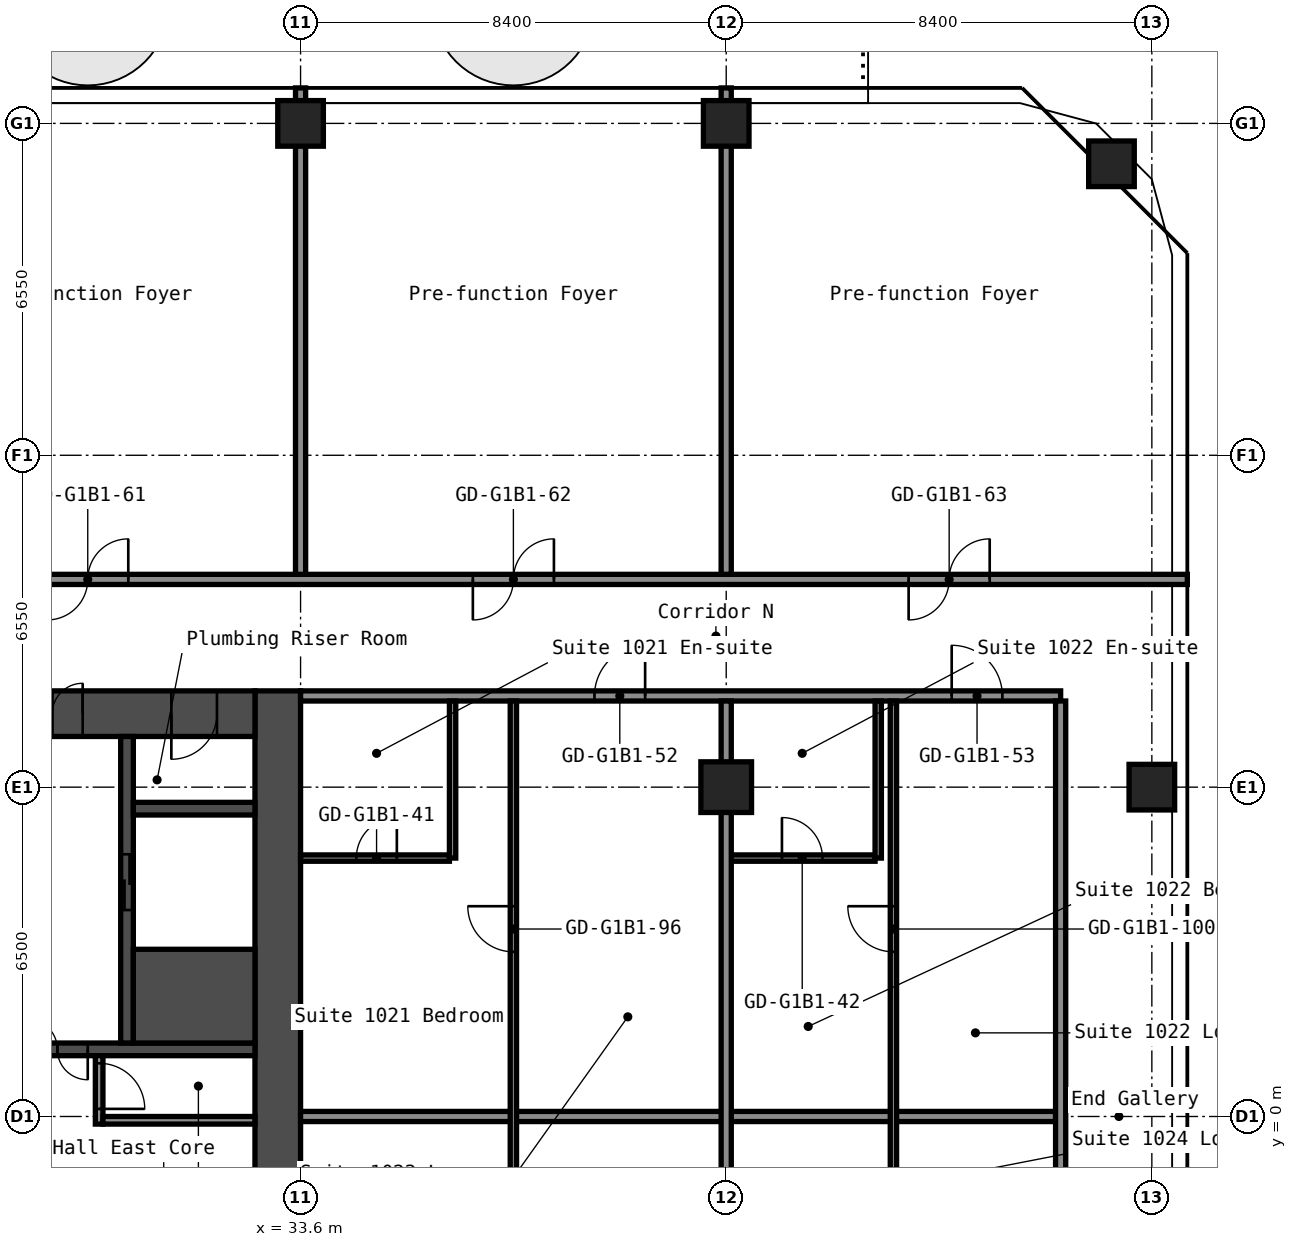
"""IFC4 building model, lengths in metres.
Left out: names, types, materials, properties, quantities, classifications, styles, units other than length and angle.
Written with IfcOpenShell. Run it as: python <this file> out.ifc"""

import sys

from ifc_helpers import new_model, si_unit, direction, frame, frame_2d, origin, origin_2d, place, context, subcontext, project, spatial, rectangle, hollow_rectangle, extrude, element, fill, save


model = new_model("IFC4")
c1 = context("Model", 3, precision=1e-05, world=origin(), true_north=direction((0.0, 1.0)))
c2 = subcontext(c1, "Body", "Model", "MODEL_VIEW")
j1 = project(units=[si_unit("LENGTHUNIT", "METRE"), si_unit("PLANEANGLEUNIT", "RADIAN")], contexts=[c1])
p1 = place(None, origin())
s1 = spatial("IfcSite", under=j1, at=p1, CompositionType="ELEMENT")
p2 = place(p1, origin())
s2 = spatial("IfcBuilding", under=s1, at=p2, CompositionType="ELEMENT")
p3 = place(p2, frame((0.0, 0.0, 39.0)))
s3 = spatial("IfcBuildingStorey", under=s2, at=p3, CompositionType="ELEMENT", Elevation=39.0)
p4 = place(p3, frame((33.6, 19.6, 0.0), z_axis=(0.0, 0.0, 1.0), x_axis=(1.0, 0.0, 0.0)))
e1 = element("IfcColumn", 1, at=p4, inside=s3, PredefinedType="COLUMN", context=c2, shape_type="SweptSolid", body=[
    extrude(hollow_rectangle(XDim=0.9, YDim=0.9, WallThickness=0.036, at=origin_2d()), origin(), (0.0, 0.0, 1.0), 2.8),
])
p5 = place(p3, frame((42.0, 6.5, 0.0), z_axis=(0.0, 0.0, 1.0), x_axis=(1.0, 0.0, 0.0)))
e2 = element("IfcColumn", 2, at=p5, inside=s3, PredefinedType="COLUMN", context=c2, shape_type="SweptSolid", body=[
    extrude(hollow_rectangle(XDim=1.0, YDim=1.0, WallThickness=0.04, at=origin_2d()), origin(), (0.0, 0.0, 1.0), 2.8),
])
for number, where, z_axis, x_axis in (
    (3, (42.0, 19.6, 0.0), (0.0, 0.0, 1.0), (1.0, 0.0, 0.0)),
    (4, (50.4, 6.5, 0.0), (0.0, 0.0, 1.0), (1.0, 0.0, 0.0)),
    (5, (49.603, 18.803, 0.0), (0.0, 0.0, 1.0), (1.0, 0.0, 0.0)),
):
    element("IfcColumn", number, at=place(p3, frame(where, z_axis=z_axis, x_axis=x_axis)), inside=s3, PredefinedType="COLUMN", context=c2, shape_type="SweptSolid", body=[
        extrude(hollow_rectangle(XDim=0.9, YDim=0.9, WallThickness=0.036, at=origin_2d()), origin(), (0.0, 0.0, 1.0), 2.8),
    ])
p6 = place(p3, frame((33.15, -8.4, 0.0), z_axis=(0.0, 0.0, 1.0), x_axis=(0.0, 1.0, 0.0)))
e6 = element("IfcWall", 6, at=p6, inside=s3, PredefinedType="SHEAR", context=c2, shape_type="SweptSolid", body=[
    extrude(rectangle(XDim=16.8, YDim=0.9, at=frame_2d((8.4, 0.0))), origin(), (0.0, 0.0, 1.0), 2.8),
])
p7 = place(p3, frame((17.7, 7.95, 0.0), z_axis=(0.0, 0.0, 1.0), x_axis=(1.0, 0.0, 0.0)))
e7 = element("IfcWall", 7, at=p7, inside=s3, PredefinedType="SHEAR", context=c2, shape_type="SweptSolid", body=[
    extrude(rectangle(XDim=15.0, YDim=0.9, at=frame_2d((7.5, 0.0))), origin(), (0.0, 0.0, 1.0), 2.8),
])
p8 = place(p7, frame((10.4, 0.0, 0.0)))
e8 = element("IfcOpeningElement", 8, at=p8, cuts=e7, PredefinedType="OPENING", context=c2, shape_type="SweptSolid", body=[
    extrude(rectangle(XDim=1.2, YDim=2.1, at=frame_2d((0.6, 1.05))), frame((0.0, 0.46, 0.0), z_axis=(0.0, -1.0, 0.0), x_axis=(1.0, 0.0, 0.0)), (0.0, 0.0, 1.0), 0.92),
])
p9 = place(p7, frame((13.35, 0.0, 0.0)))
e9 = element("IfcOpeningElement", 9, at=p9, cuts=e7, PredefinedType="OPENING", context=c2, shape_type="SweptSolid", body=[
    extrude(rectangle(XDim=0.9, YDim=2.1, at=frame_2d((0.45, 1.05))), frame((0.0, 0.46, 0.0), z_axis=(0.0, -1.0, 0.0), x_axis=(1.0, 0.0, 0.0)), (0.0, 0.0, 1.0), 0.92),
])
p10 = place(p3, frame((27.65, 1.325, 0.0), z_axis=(0.0, 0.0, 1.0), x_axis=(1.0, 0.0, 0.0)))
e10 = element("IfcWall", 10, at=p10, inside=s3, PredefinedType="SHEAR", context=c2, shape_type="SweptSolid", body=[
    extrude(rectangle(XDim=5.05, YDim=0.25, at=frame_2d((2.525, 0.0))), origin(), (0.0, 0.0, 1.0), 2.8),
])
p11 = place(p10, frame((0.55, 0.0, 0.0)))
e11 = element("IfcOpeningElement", 11, at=p11, cuts=e10, PredefinedType="OPENING", context=c2, shape_type="SweptSolid", body=[
    extrude(rectangle(XDim=1.2, YDim=2.1, at=frame_2d((0.6, 1.05))), frame((0.0, 0.135, 0.0), z_axis=(0.0, -1.0, 0.0), x_axis=(1.0, 0.0, 0.0)), (0.0, 0.0, 1.0), 0.27),
])
p12 = place(p3, frame((30.175, 1.45, 0.0), z_axis=(0.0, 0.0, 1.0), x_axis=(0.0, 1.0, 0.0)))
e12 = element("IfcWall", 12, at=p12, inside=s3, PredefinedType="SHEAR", context=c2, shape_type="SweptSolid", body=[
    extrude(rectangle(XDim=6.05, YDim=0.25, at=frame_2d((3.025, 0.0))), origin(), (0.0, 0.0, 1.0), 2.8),
])
p13 = place(p12, frame((2.625, 0.0, 0.0)))
e13 = element("IfcOpeningElement", 13, at=p13, cuts=e12, PredefinedType="OPENING", context=c2, shape_type="SweptSolid", body=[
    extrude(rectangle(XDim=1.1, YDim=2.1, at=frame_2d((0.55, 1.05))), frame((0.0, 0.135, 0.0), z_axis=(0.0, -1.0, 0.0), x_axis=(1.0, 0.0, 0.0)), (0.0, 0.0, 1.0), 0.27),
])
p14 = place(p3, frame((30.3, 2.375, 0.0), z_axis=(0.0, 0.0, 1.0), x_axis=(1.0, 0.0, 0.0)))
e14 = element("IfcWall", 14, at=p14, inside=s3, PredefinedType="SHEAR", context=c2, shape_type="SweptSolid", body=[
    extrude(rectangle(XDim=2.4, YDim=1.85, at=frame_2d((1.2, 0.0))), origin(), (0.0, 0.0, 1.0), 2.8),
])
p15 = place(p3, frame((30.3, 6.075, 0.0), z_axis=(0.0, 0.0, 1.0), x_axis=(1.0, 0.0, 0.0)))
e15 = element("IfcWall", 15, at=p15, inside=s3, PredefinedType="SHEAR", context=c2, shape_type="SweptSolid", body=[
    extrude(rectangle(XDim=2.4, YDim=0.25, at=frame_2d((1.2, 0.0))), origin(), (0.0, 0.0, 1.0), 2.8),
])
p16 = place(p3, frame((29.625, -0.15, 0.0), z_axis=(0.0, 0.0, 1.0), x_axis=(0.0, 1.0, 0.0)))
e16 = element("IfcWall", 16, at=p16, inside=s3, PredefinedType="PARTITIONING", context=c2, shape_type="SweptSolid", body=[
    extrude(rectangle(XDim=1.35, YDim=0.15, at=frame_2d((0.675, 0.0))), origin(), (0.0, 0.0, 1.0), 2.8),
])
p17 = place(p16, frame((0.3, 0.0, 0.0)))
e17 = element("IfcOpeningElement", 17, at=p17, cuts=e16, PredefinedType="OPENING", context=c2, shape_type="SweptSolid", body=[
    extrude(rectangle(XDim=0.9, YDim=2.1, at=frame_2d((0.45, 1.05))), frame((0.0, 0.085, 0.0), z_axis=(0.0, -1.0, 0.0), x_axis=(1.0, 0.0, 0.0)), (0.0, 0.0, 1.0), 0.17),
])
p18 = place(p3, frame((29.7, -0.075, 0.0), z_axis=(0.0, 0.0, 1.0), x_axis=(1.0, 0.0, 0.0)))
e18 = element("IfcWall", 18, at=p18, inside=s3, PredefinedType="PARTITIONING", context=c2, shape_type="SweptSolid", body=[
    extrude(rectangle(XDim=3.0, YDim=0.15, at=frame_2d((1.5, 0.0))), origin(), (0.0, 0.0, 1.0), 2.8),
])
p19 = place(p3, frame((33.6, 0.0, 0.0), z_axis=(0.0, 0.0, 1.0), x_axis=(1.0, 0.0, 0.0)))
e19 = element("IfcWall", 19, at=p19, inside=s3, PredefinedType="PARTITIONING", context=c2, shape_type="SweptSolid", body=[
    extrude(rectangle(XDim=14.9, YDim=0.2, at=frame_2d((7.45, 0.0))), origin(), (0.0, 0.0, 1.0), 2.8),
])
p20 = place(p3, frame((33.6, 5.1, 0.0), z_axis=(0.0, 0.0, 1.0), x_axis=(1.0, 0.0, 0.0)))
e20 = element("IfcWall", 20, at=p20, inside=s3, PredefinedType="PARTITIONING", context=c2, shape_type="SweptSolid", body=[
    extrude(rectangle(XDim=2.938, YDim=0.125, at=frame_2d((1.469, 0.0))), origin(), (0.0, 0.0, 1.0), 2.8),
])
p21 = place(p20, frame((1.1, 0.0, 0.0)))
e21 = element("IfcOpeningElement", 21, at=p21, cuts=e20, PredefinedType="OPENING", context=c2, shape_type="SweptSolid", body=[
    extrude(rectangle(XDim=0.8, YDim=2.1, at=frame_2d((0.4, 1.05))), frame((0.0, 0.073, 0.0), z_axis=(0.0, -1.0, 0.0), x_axis=(1.0, 0.0, 0.0)), (0.0, 0.0, 1.0), 0.145),
])
p22 = place(p3, frame((42.1, 5.1, 0.0), z_axis=(0.0, 0.0, 1.0), x_axis=(1.0, 0.0, 0.0)))
e22 = element("IfcWall", 22, at=p22, inside=s3, PredefinedType="PARTITIONING", context=c2, shape_type="SweptSolid", body=[
    extrude(rectangle(XDim=2.837, YDim=0.125, at=frame_2d((1.419, 0.0))), origin(), (0.0, 0.0, 1.0), 2.8),
])
p23 = place(p22, frame((1.0, 0.0, 0.0)))
e23 = element("IfcOpeningElement", 23, at=p23, cuts=e22, PredefinedType="OPENING", context=c2, shape_type="SweptSolid", body=[
    extrude(rectangle(XDim=0.8, YDim=2.1, at=frame_2d((0.4, 1.05))), frame((0.0, 0.073, 0.0), z_axis=(0.0, -1.0, 0.0), x_axis=(1.0, 0.0, 0.0)), (0.0, 0.0, 1.0), 0.145),
])
p24 = place(p3, frame((33.6, 8.3, 0.0), z_axis=(0.0, 0.0, 1.0), x_axis=(1.0, 0.0, 0.0)))
e24 = element("IfcWall", 24, at=p24, inside=s3, PredefinedType="PARTITIONING", context=c2, shape_type="SweptSolid", body=[
    extrude(rectangle(XDim=15.0, YDim=0.2, at=frame_2d((7.5, 0.0))), origin(), (0.0, 0.0, 1.0), 2.8),
])
p25 = place(p24, frame((5.8, 0.0, 0.0)))
e25 = element("IfcOpeningElement", 25, at=p25, cuts=e24, PredefinedType="OPENING", context=c2, shape_type="SweptSolid", body=[
    extrude(rectangle(XDim=1.0, YDim=2.1, at=frame_2d((0.5, 1.05))), frame((0.0, 0.11, 0.0), z_axis=(0.0, -1.0, 0.0), x_axis=(1.0, 0.0, 0.0)), (0.0, 0.0, 1.0), 0.22),
])
p26 = place(p24, frame((12.85, 0.0, 0.0)))
e26 = element("IfcOpeningElement", 26, at=p26, cuts=e24, PredefinedType="OPENING", context=c2, shape_type="SweptSolid", body=[
    extrude(rectangle(XDim=1.0, YDim=2.1, at=frame_2d((0.5, 1.05))), frame((0.0, 0.11, 0.0), z_axis=(0.0, -1.0, 0.0), x_axis=(1.0, 0.0, 0.0)), (0.0, 0.0, 1.0), 0.22),
])
p27 = place(p3, frame((16.8, 10.6, 0.0), z_axis=(0.0, 0.0, 1.0), x_axis=(1.0, 0.0, 0.0)))
e27 = element("IfcWall", 27, at=p27, inside=s3, PredefinedType="PARTITIONING", context=c2, shape_type="SweptSolid", body=[
    extrude(rectangle(XDim=34.3, YDim=0.2, at=frame_2d((17.15, 0.0))), origin(), (0.0, 0.0, 1.0), 2.8),
])
p28 = place(p27, frame((3.4, 0.0, 0.0)))
e28 = element("IfcOpeningElement", 28, at=p28, cuts=e27, PredefinedType="OPENING", context=c2, shape_type="SweptSolid", body=[
    extrude(rectangle(XDim=1.6, YDim=2.1, at=frame_2d((0.8, 1.05))), frame((0.0, 0.11, 0.0), z_axis=(0.0, -1.0, 0.0), x_axis=(1.0, 0.0, 0.0)), (0.0, 0.0, 1.0), 0.22),
])
p29 = place(p27, frame((11.8, 0.0, 0.0)))
e29 = element("IfcOpeningElement", 29, at=p29, cuts=e27, PredefinedType="OPENING", context=c2, shape_type="SweptSolid", body=[
    extrude(rectangle(XDim=1.6, YDim=2.1, at=frame_2d((0.8, 1.05))), frame((0.0, 0.11, 0.0), z_axis=(0.0, -1.0, 0.0), x_axis=(1.0, 0.0, 0.0)), (0.0, 0.0, 1.0), 0.22),
])
p30 = place(p27, frame((20.2, 0.0, 0.0)))
e30 = element("IfcOpeningElement", 30, at=p30, cuts=e27, PredefinedType="OPENING", context=c2, shape_type="SweptSolid", body=[
    extrude(rectangle(XDim=1.6, YDim=2.1, at=frame_2d((0.8, 1.05))), frame((0.0, 0.11, 0.0), z_axis=(0.0, -1.0, 0.0), x_axis=(1.0, 0.0, 0.0)), (0.0, 0.0, 1.0), 0.22),
])
p31 = place(p27, frame((28.8, 0.0, 0.0)))
e31 = element("IfcOpeningElement", 31, at=p31, cuts=e27, PredefinedType="OPENING", context=c2, shape_type="SweptSolid", body=[
    extrude(rectangle(XDim=1.6, YDim=2.1, at=frame_2d((0.8, 1.05))), frame((0.0, 0.11, 0.0), z_axis=(0.0, -1.0, 0.0), x_axis=(1.0, 0.0, 0.0)), (0.0, 0.0, 1.0), 0.22),
])
p32 = place(p3, frame((33.6, 10.7, 0.0), z_axis=(0.0, 0.0, 1.0), x_axis=(0.0, 1.0, 0.0)))
e32 = element("IfcWall", 32, at=p32, inside=s3, PredefinedType="PARTITIONING", context=c2, shape_type="SweptSolid", body=[
    extrude(rectangle(XDim=9.6, YDim=0.2, at=frame_2d((4.8, 0.0))), origin(), (0.0, 0.0, 1.0), 2.8),
])
p33 = place(p3, frame((36.6, 5.1, 0.0), z_axis=(0.0, 0.0, 1.0), x_axis=(0.0, 1.0, 0.0)))
e33 = element("IfcWall", 33, at=p33, inside=s3, PredefinedType="PARTITIONING", context=c2, shape_type="SweptSolid", body=[
    extrude(rectangle(XDim=3.1, YDim=0.125, at=frame_2d((1.55, 0.0))), origin(), (0.0, 0.0, 1.0), 2.8),
])
p34 = place(p3, frame((37.8, -8.2, 0.0), z_axis=(0.0, 0.0, 1.0), x_axis=(0.0, 1.0, 0.0)))
e34 = element("IfcWall", 34, at=p34, inside=s3, PredefinedType="PARTITIONING", context=c2, shape_type="SweptSolid", body=[
    extrude(rectangle(XDim=16.4, YDim=0.125, at=frame_2d((8.2, 0.0))), origin(), (0.0, 0.0, 1.0), 2.8),
])
p35 = place(p34, frame((4.05, 0.0, 0.0)))
e35 = element("IfcOpeningElement", 35, at=p35, cuts=e34, PredefinedType="OPENING", context=c2, shape_type="SweptSolid", body=[
    extrude(rectangle(XDim=0.9, YDim=2.1, at=frame_2d((0.45, 1.05))), frame((0.0, 0.073, 0.0), z_axis=(0.0, -1.0, 0.0), x_axis=(1.0, 0.0, 0.0)), (0.0, 0.0, 1.0), 0.145),
])
p36 = place(p34, frame((11.45, 0.0, 0.0)))
e36 = element("IfcOpeningElement", 36, at=p36, cuts=e34, PredefinedType="OPENING", context=c2, shape_type="SweptSolid", body=[
    extrude(rectangle(XDim=0.9, YDim=2.1, at=frame_2d((0.45, 1.05))), frame((0.0, 0.073, 0.0), z_axis=(0.0, -1.0, 0.0), x_axis=(1.0, 0.0, 0.0)), (0.0, 0.0, 1.0), 0.145),
])
p37 = place(p3, frame((42.0, -8.2, 0.0), z_axis=(0.0, 0.0, 1.0), x_axis=(0.0, 1.0, 0.0)))
e37 = element("IfcWall", 37, at=p37, inside=s3, PredefinedType="PARTITIONING", context=c2, shape_type="SweptSolid", body=[
    extrude(rectangle(XDim=16.4, YDim=0.2, at=frame_2d((8.2, 0.0))), origin(), (0.0, 0.0, 1.0), 2.8),
])
p38 = place(p3, frame((42.0, 10.7, 0.0), z_axis=(0.0, 0.0, 1.0), x_axis=(0.0, 1.0, 0.0)))
e38 = element("IfcWall", 38, at=p38, inside=s3, PredefinedType="PARTITIONING", context=c2, shape_type="SweptSolid", body=[
    extrude(rectangle(XDim=9.6, YDim=0.2, at=frame_2d((4.8, 0.0))), origin(), (0.0, 0.0, 1.0), 2.8),
])
p39 = place(p3, frame((45.0, 5.1, 0.0), z_axis=(0.0, 0.0, 1.0), x_axis=(0.0, 1.0, 0.0)))
e39 = element("IfcWall", 39, at=p39, inside=s3, PredefinedType="PARTITIONING", context=c2, shape_type="SweptSolid", body=[
    extrude(rectangle(XDim=3.1, YDim=0.125, at=frame_2d((1.55, 0.0))), origin(), (0.0, 0.0, 1.0), 2.8),
])
p40 = place(p3, frame((45.3, -8.2, 0.0), z_axis=(0.0, 0.0, 1.0), x_axis=(0.0, 1.0, 0.0)))
e40 = element("IfcWall", 40, at=p40, inside=s3, PredefinedType="PARTITIONING", context=c2, shape_type="SweptSolid", body=[
    extrude(rectangle(XDim=16.4, YDim=0.125, at=frame_2d((8.2, 0.0))), origin(), (0.0, 0.0, 1.0), 2.8),
])
p41 = place(p40, frame((4.05, 0.0, 0.0)))
e41 = element("IfcOpeningElement", 41, at=p41, cuts=e40, PredefinedType="OPENING", context=c2, shape_type="SweptSolid", body=[
    extrude(rectangle(XDim=0.9, YDim=2.1, at=frame_2d((0.45, 1.05))), frame((0.0, 0.073, 0.0), z_axis=(0.0, -1.0, 0.0), x_axis=(1.0, 0.0, 0.0)), (0.0, 0.0, 1.0), 0.145),
])
p42 = place(p40, frame((11.45, 0.0, 0.0)))
e42 = element("IfcOpeningElement", 42, at=p42, cuts=e40, PredefinedType="OPENING", context=c2, shape_type="SweptSolid", body=[
    extrude(rectangle(XDim=0.9, YDim=2.1, at=frame_2d((0.45, 1.05))), frame((0.0, 0.073, 0.0), z_axis=(0.0, -1.0, 0.0), x_axis=(1.0, 0.0, 0.0)), (0.0, 0.0, 1.0), 0.145),
])
p43 = place(p3, frame((48.6, -8.2, 0.0), z_axis=(0.0, 0.0, 1.0), x_axis=(0.0, 1.0, 0.0)))
e43 = element("IfcWall", 43, at=p43, inside=s3, PredefinedType="PARTITIONING", context=c2, shape_type="SweptSolid", body=[
    extrude(rectangle(XDim=16.4, YDim=0.2, at=frame_2d((8.2, 0.0))), origin(), (0.0, 0.0, 1.0), 2.8),
])
p44 = place(p8, origin())
e44 = element("IfcDoor", 44, at=p44, inside=s3, OperationType="DOUBLE_DOOR_SINGLE_SWING", PredefinedType="DOOR", context=c2, shape_type="SweptSolid", body=[
    extrude(rectangle(XDim=1.2, YDim=2.1, at=frame_2d((0.6, 1.05))), frame((0.0, 0.025, 0.0), z_axis=(0.0, -1.0, 0.0), x_axis=(1.0, 0.0, 0.0)), (0.0, 0.0, 1.0), 0.05),
])
fill(e8, e44)
p45 = place(p9, origin())
e45 = element("IfcDoor", 45, at=p45, inside=s3, OperationType="SINGLE_SWING_LEFT", PredefinedType="DOOR", context=c2, shape_type="SweptSolid", body=[
    extrude(rectangle(XDim=0.9, YDim=2.1, at=frame_2d((0.45, 1.05))), frame((0.0, 0.025, 0.0), z_axis=(0.0, -1.0, 0.0), x_axis=(1.0, 0.0, 0.0)), (0.0, 0.0, 1.0), 0.05),
])
fill(e9, e45)
p46 = place(p11, origin())
e46 = element("IfcDoor", 46, at=p46, inside=s3, OperationType="DOUBLE_DOOR_SINGLE_SWING", PredefinedType="DOOR", context=c2, shape_type="SweptSolid", body=[
    extrude(rectangle(XDim=1.2, YDim=2.1, at=frame_2d((0.6, 1.05))), frame((0.0, 0.025, 0.0), z_axis=(0.0, -1.0, 0.0), x_axis=(1.0, 0.0, 0.0)), (0.0, 0.0, 1.0), 0.05),
])
fill(e11, e46)
p47 = place(p17, origin())
e47 = element("IfcDoor", 47, at=p47, inside=s3, OperationType="SINGLE_SWING_LEFT", PredefinedType="DOOR", context=c2, shape_type="SweptSolid", body=[
    extrude(rectangle(XDim=0.9, YDim=2.1, at=frame_2d((0.45, 1.05))), frame((0.0, 0.025, 0.0), z_axis=(0.0, -1.0, 0.0), x_axis=(1.0, 0.0, 0.0)), (0.0, 0.0, 1.0), 0.05),
])
fill(e17, e47)
p48 = place(p13, origin())
e48 = element("IfcDoor", 48, at=p48, inside=s3, OperationType="DOUBLE_DOOR_SLIDING", PredefinedType="DOOR", context=c2, shape_type="SweptSolid", body=[
    extrude(rectangle(XDim=1.1, YDim=2.1, at=frame_2d((0.55, 1.05))), frame((0.0, 0.025, 0.0), z_axis=(0.0, -1.0, 0.0), x_axis=(1.0, 0.0, 0.0)), (0.0, 0.0, 1.0), 0.05),
])
fill(e13, e48)
p49 = place(p21, origin())
e49 = element("IfcDoor", 49, at=p49, inside=s3, OperationType="SINGLE_SWING_LEFT", PredefinedType="DOOR", context=c2, shape_type="SweptSolid", body=[
    extrude(rectangle(XDim=0.8, YDim=2.1, at=frame_2d((0.4, 1.05))), frame((0.0, 0.025, 0.0), z_axis=(0.0, -1.0, 0.0), x_axis=(1.0, 0.0, 0.0)), (0.0, 0.0, 1.0), 0.05),
])
fill(e21, e49)
p50 = place(p23, origin())
e50 = element("IfcDoor", 50, at=p50, inside=s3, OperationType="SINGLE_SWING_RIGHT", PredefinedType="DOOR", context=c2, shape_type="SweptSolid", body=[
    extrude(rectangle(XDim=0.8, YDim=2.1, at=frame_2d((0.4, 1.05))), frame((0.0, 0.025, 0.0), z_axis=(0.0, -1.0, 0.0), x_axis=(1.0, 0.0, 0.0)), (0.0, 0.0, 1.0), 0.05),
])
fill(e23, e50)
p51 = place(p25, origin())
e51 = element("IfcDoor", 51, at=p51, inside=s3, OperationType="SINGLE_SWING_LEFT", PredefinedType="DOOR", context=c2, shape_type="SweptSolid", body=[
    extrude(rectangle(XDim=1.0, YDim=2.1, at=frame_2d((0.5, 1.05))), frame((0.0, 0.025, 0.0), z_axis=(0.0, -1.0, 0.0), x_axis=(1.0, 0.0, 0.0)), (0.0, 0.0, 1.0), 0.05),
])
fill(e25, e51)
p52 = place(p26, origin())
e52 = element("IfcDoor", 52, at=p52, inside=s3, OperationType="SINGLE_SWING_RIGHT", PredefinedType="DOOR", context=c2, shape_type="SweptSolid", body=[
    extrude(rectangle(XDim=1.0, YDim=2.1, at=frame_2d((0.5, 1.05))), frame((0.0, 0.025, 0.0), z_axis=(0.0, -1.0, 0.0), x_axis=(1.0, 0.0, 0.0)), (0.0, 0.0, 1.0), 0.05),
])
fill(e26, e52)
p53 = place(p29, origin())
e53 = element("IfcDoor", 53, at=p53, inside=s3, OperationType="DOUBLE_DOOR_SINGLE_SWING", PredefinedType="DOOR", context=c2, shape_type="SweptSolid", body=[
    extrude(rectangle(XDim=1.6, YDim=2.1, at=frame_2d((0.8, 1.05))), frame((0.0, 0.025, 0.0), z_axis=(0.0, -1.0, 0.0), x_axis=(1.0, 0.0, 0.0)), (0.0, 0.0, 1.0), 0.05),
])
fill(e29, e53)
p54 = place(p30, origin())
e54 = element("IfcDoor", 54, at=p54, inside=s3, OperationType="DOUBLE_DOOR_SINGLE_SWING", PredefinedType="DOOR", context=c2, shape_type="SweptSolid", body=[
    extrude(rectangle(XDim=1.6, YDim=2.1, at=frame_2d((0.8, 1.05))), frame((0.0, 0.025, 0.0), z_axis=(0.0, -1.0, 0.0), x_axis=(1.0, 0.0, 0.0)), (0.0, 0.0, 1.0), 0.05),
])
fill(e30, e54)
p55 = place(p31, origin())
e55 = element("IfcDoor", 55, at=p55, inside=s3, OperationType="DOUBLE_DOOR_SINGLE_SWING", PredefinedType="DOOR", context=c2, shape_type="SweptSolid", body=[
    extrude(rectangle(XDim=1.6, YDim=2.1, at=frame_2d((0.8, 1.05))), frame((0.0, 0.025, 0.0), z_axis=(0.0, -1.0, 0.0), x_axis=(1.0, 0.0, 0.0)), (0.0, 0.0, 1.0), 0.05),
])
fill(e31, e55)
p56 = place(p36, origin())
e56 = element("IfcDoor", 56, at=p56, inside=s3, OperationType="SINGLE_SWING_LEFT", PredefinedType="DOOR", context=c2, shape_type="SweptSolid", body=[
    extrude(rectangle(XDim=0.9, YDim=2.1, at=frame_2d((0.45, 1.05))), frame((0.0, 0.025, 0.0), z_axis=(0.0, -1.0, 0.0), x_axis=(1.0, 0.0, 0.0)), (0.0, 0.0, 1.0), 0.05),
])
fill(e36, e56)
p57 = place(p42, origin())
e57 = element("IfcDoor", 57, at=p57, inside=s3, OperationType="SINGLE_SWING_LEFT", PredefinedType="DOOR", context=c2, shape_type="SweptSolid", body=[
    extrude(rectangle(XDim=0.9, YDim=2.1, at=frame_2d((0.45, 1.05))), frame((0.0, 0.025, 0.0), z_axis=(0.0, -1.0, 0.0), x_axis=(1.0, 0.0, 0.0)), (0.0, 0.0, 1.0), 0.05),
])
fill(e42, e57)
save(model, sys.argv[1])
